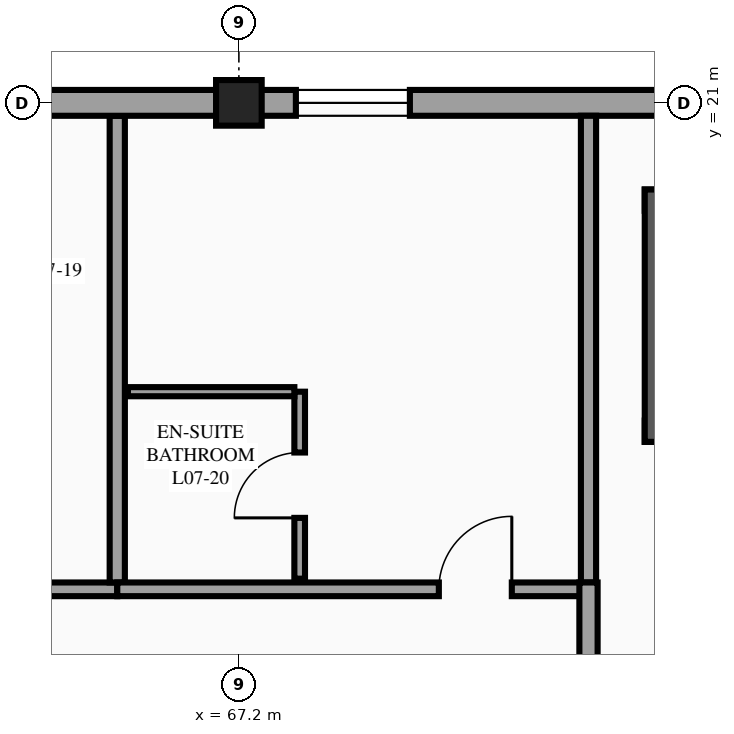
"""IFC4 building model, lengths in metres.
Left out: names, types, materials, properties, quantities, classifications, styles, units other than length and angle.
Written with IfcOpenShell. Run it as: python <this file> out.ifc"""

import sys

from ifc_helpers import new_model, si_unit, direction, frame, frame_2d, origin, origin_2d, place, context, subcontext, project, spatial, rectangle, extrude, element, fill, save


model = new_model("IFC4")
c1 = context("Model", 3, precision=1e-05, world=origin(), true_north=direction((0.0, 1.0)))
c2 = subcontext(c1, "Body", "Model", "MODEL_VIEW")
j1 = project(units=[si_unit("LENGTHUNIT", "METRE"), si_unit("PLANEANGLEUNIT", "RADIAN")], contexts=[c1])
p1 = place(None, origin())
s1 = spatial("IfcSite", under=j1, at=p1, CompositionType="ELEMENT")
p2 = place(p1, origin())
s2 = spatial("IfcBuilding", under=s1, at=p2, CompositionType="ELEMENT")
p3 = place(p2, frame((0.0, 0.0, 29.1)))
s3 = spatial("IfcBuildingStorey", under=s2, at=p3, CompositionType="ELEMENT", Elevation=29.1)
p4 = place(p3, frame((67.2, 21.0, 0.0), z_axis=(0.0, 0.0, 1.0), x_axis=(1.0, 0.0, 0.0)))
e1 = element("IfcColumn", 1, at=p4, inside=s3, PredefinedType="COLUMN", context=c2, shape_type="SweptSolid", body=[
    extrude(rectangle(XDim=0.6, YDim=0.6, at=origin_2d()), origin(), (0.0, 0.0, 1.0), 3.6),
])
p5 = place(p3, frame((75.6, 21.0, 0.0), z_axis=(0.0, 0.0, 1.0), x_axis=(-1.0, 0.0, 0.0)))
e2 = element("IfcWall", 2, at=p5, inside=s3, PredefinedType="STANDARD", context=c2, shape_type="SweptSolid", body=[
    extrude(rectangle(XDim=8.4, YDim=0.34, at=frame_2d((4.2, 0.0))), origin(), (0.0, 0.0, 1.0), 2.43),
])
p6 = place(p5, frame((6.15, 0.0, 0.85)))
e3 = element("IfcOpeningElement", 3, at=p6, cuts=e2, PredefinedType="OPENING", context=c2, shape_type="SweptSolid", body=[
    extrude(rectangle(XDim=1.5, YDim=1.5, at=frame_2d((0.75, 0.75))), frame((0.0, 0.18, 0.0), z_axis=(0.0, -1.0, 0.0), x_axis=(1.0, 0.0, 0.0)), (0.0, 0.0, 1.0), 0.36),
])
p7 = place(p3, frame((72.54, 16.68, 0.0), z_axis=(0.0, 0.0, 1.0), x_axis=(1.0, 0.0, 0.0)))
e4 = element("IfcWall", 4, at=p7, inside=s3, PredefinedType="SHEAR", context=c2, shape_type="SweptSolid", body=[
    extrude(rectangle(XDim=2.52, YDim=0.28, at=frame_2d((1.26, 0.0))), origin(), (0.0, 0.0, 1.0), 3.6),
])
p8 = place(p7, frame((0.71, 0.0, 0.0)))
e5 = element("IfcOpeningElement", 5, at=p8, cuts=e4, PredefinedType="OPENING", context=c2, shape_type="SweptSolid", body=[
    extrude(rectangle(XDim=1.1, YDim=2.2, at=frame_2d((0.55, 1.1))), frame((0.0, 0.15, 0.0), z_axis=(0.0, -1.0, 0.0), x_axis=(1.0, 0.0, 0.0)), (0.0, 0.0, 1.0), 0.3),
])
p9 = place(p3, frame((75.06, 19.72, 0.0), z_axis=(0.0, 0.0, 1.0), x_axis=(-1.0, 0.0, 0.0)))
e6 = element("IfcWall", 6, at=p9, inside=s3, PredefinedType="SHEAR", context=c2, shape_type="SweptSolid", body=[
    extrude(rectangle(XDim=2.52, YDim=0.28, at=frame_2d((1.26, 0.0))), origin(), (0.0, 0.0, 1.0), 3.6),
])
p10 = place(p3, frame((72.68, 19.86, 0.0), z_axis=(0.0, 0.0, 1.0), x_axis=(0.0, -1.0, 0.0)))
e7 = element("IfcWall", 7, at=p10, inside=s3, PredefinedType="SHEAR", context=c2, shape_type="SweptSolid", body=[
    extrude(rectangle(XDim=3.32, YDim=0.28, at=frame_2d((1.66, 0.0))), origin(), (0.0, 0.0, 1.0), 3.6),
])
p11 = place(p3, frame((59.4, 14.6, 0.0), z_axis=(0.0, 0.0, 1.0), x_axis=(1.0, 0.0, 0.0)))
e8 = element("IfcWall", 8, at=p11, inside=s3, PredefinedType="PARTITIONING", context=c2, shape_type="SweptSolid", body=[
    extrude(rectangle(XDim=6.2, YDim=0.18, at=frame_2d((3.1, 0.0))), origin(), (0.0, 0.0, 1.0), 3.375),
])
p12 = place(p11, frame((4.231, 0.0, 0.0)))
e9 = element("IfcOpeningElement", 9, at=p12, cuts=e8, PredefinedType="OPENING", context=c2, shape_type="SweptSolid", body=[
    extrude(rectangle(XDim=0.96, YDim=2.15, at=frame_2d((0.48, 1.075))), frame((0.0, 0.1, 0.0), z_axis=(0.0, -1.0, 0.0), x_axis=(1.0, 0.0, 0.0)), (0.0, 0.0, 1.0), 0.2),
])
p13 = place(p3, frame((65.6, 14.69, 0.0), z_axis=(0.0, 0.0, 1.0), x_axis=(0.0, 1.0, 0.0)))
e10 = element("IfcWall", 10, at=p13, inside=s3, PredefinedType="PARTITIONING", context=c2, shape_type="SweptSolid", body=[
    extrude(rectangle(XDim=6.14, YDim=0.2, at=frame_2d((3.07, 0.0))), origin(), (0.0, 0.0, 1.0), 3.375),
])
p14 = place(p3, frame((65.6, 14.6, 0.0), z_axis=(0.0, 0.0, 1.0), x_axis=(1.0, 0.0, 0.0)))
e11 = element("IfcWall", 11, at=p14, inside=s3, PredefinedType="PARTITIONING", context=c2, shape_type="SweptSolid", body=[
    extrude(rectangle(XDim=6.2, YDim=0.18, at=frame_2d((3.1, 0.0))), origin(), (0.0, 0.0, 1.0), 3.375),
])
p15 = place(p14, frame((4.231, 0.0, 0.0)))
e12 = element("IfcOpeningElement", 12, at=p15, cuts=e11, PredefinedType="OPENING", context=c2, shape_type="SweptSolid", body=[
    extrude(rectangle(XDim=0.96, YDim=2.15, at=frame_2d((0.48, 1.075))), frame((0.0, 0.1, 0.0), z_axis=(0.0, -1.0, 0.0), x_axis=(1.0, 0.0, 0.0)), (0.0, 0.0, 1.0), 0.2),
])
p16 = place(p3, frame((71.8, 14.69, 0.0), z_axis=(0.0, 0.0, 1.0), x_axis=(0.0, 1.0, 0.0)))
e13 = element("IfcWall", 13, at=p16, inside=s3, PredefinedType="PARTITIONING", context=c2, shape_type="SweptSolid", body=[
    extrude(rectangle(XDim=6.14, YDim=0.2, at=frame_2d((3.07, 0.0))), origin(), (0.0, 0.0, 1.0), 3.375),
])
p17 = place(p3, frame((68.0, 14.74, 0.0), z_axis=(0.0, 0.0, 1.0), x_axis=(0.0, 1.0, 0.0)))
e14 = element("IfcWall", 14, at=p17, inside=s3, PredefinedType="PARTITIONING", context=c2, shape_type="SweptSolid", body=[
    extrude(rectangle(XDim=2.46, YDim=0.14, at=frame_2d((1.23, 0.0))), origin(), (0.0, 0.0, 1.0), 3.375),
])
p18 = place(p17, frame((0.8, 0.0, 0.0)))
e15 = element("IfcOpeningElement", 15, at=p18, cuts=e14, PredefinedType="OPENING", context=c2, shape_type="SweptSolid", body=[
    extrude(rectangle(XDim=0.86, YDim=2.1, at=frame_2d((0.43, 1.05))), frame((0.0, 0.08, 0.0), z_axis=(0.0, -1.0, 0.0), x_axis=(1.0, 0.0, 0.0)), (0.0, 0.0, 1.0), 0.16),
])
p19 = place(p3, frame((65.74, 17.2, 0.0), z_axis=(0.0, 0.0, 1.0), x_axis=(1.0, 0.0, 0.0)))
e16 = element("IfcWall", 16, at=p19, inside=s3, PredefinedType="PARTITIONING", context=c2, shape_type="SweptSolid", body=[
    extrude(rectangle(XDim=2.19, YDim=0.12, at=frame_2d((1.095, 0.0))), origin(), (0.0, 0.0, 1.0), 3.375),
])
p20 = place(p3, frame((71.8, 12.94, 0.0), z_axis=(0.0, 0.0, 1.0), x_axis=(0.0, 1.0, 0.0)))
e17 = element("IfcWall", 17, at=p20, inside=s3, PredefinedType="PARTITIONING", context=c2, shape_type="SweptSolid", body=[
    extrude(rectangle(XDim=1.75, YDim=0.24, at=frame_2d((0.875, 0.0))), origin(), (0.0, 0.0, 1.0), 3.375),
])
p21 = place(p3, frame((67.2, 21.0, 0.0), z_axis=(0.0, 0.0, 1.0), x_axis=(-1.0, 0.0, 0.0)))
e18 = element("IfcWall", 18, at=p21, inside=s3, PredefinedType="STANDARD", context=c2, shape_type="SweptSolid", body=[
    extrude(rectangle(XDim=8.4, YDim=0.34, at=frame_2d((4.2, 0.0))), origin(), (0.0, 0.0, 1.0), 2.78),
])
p22 = place(p21, frame((3.95, 0.0, 0.85)))
e19 = element("IfcOpeningElement", 19, at=p22, cuts=e18, PredefinedType="OPENING", context=c2, shape_type="SweptSolid", body=[
    extrude(rectangle(XDim=1.5, YDim=1.5, at=frame_2d((0.75, 0.75))), frame((0.0, 0.18, 0.0), z_axis=(0.0, -1.0, 0.0), x_axis=(1.0, 0.0, 0.0)), (0.0, 0.0, 1.0), 0.36),
])
p23 = place(p6, origin())
e20 = element("IfcWindow", 20, at=p23, inside=s3, PartitioningType="SINGLE_PANEL", PredefinedType="WINDOW", context=c2, shape_type="SweptSolid", body=[
    extrude(rectangle(XDim=1.5, YDim=1.5, at=frame_2d((0.75, 0.75))), frame((0.0, 0.03, 0.0), z_axis=(0.0, -1.0, 0.0), x_axis=(1.0, 0.0, 0.0)), (0.0, 0.0, 1.0), 0.06),
])
fill(e3, e20)
p24 = place(p15, origin())
e21 = element("IfcDoor", 21, at=p24, inside=s3, OperationType="SINGLE_SWING_RIGHT", PredefinedType="DOOR", context=c2, shape_type="SweptSolid", body=[
    extrude(rectangle(XDim=0.96, YDim=2.15, at=frame_2d((0.48, 1.075))), frame((0.0, 0.025, 0.0), z_axis=(0.0, -1.0, 0.0), x_axis=(1.0, 0.0, 0.0)), (0.0, 0.0, 1.0), 0.05),
])
fill(e12, e21)
p25 = place(p18, origin())
e22 = element("IfcDoor", 22, at=p25, inside=s3, OperationType="SINGLE_SWING_LEFT", PredefinedType="DOOR", context=c2, shape_type="SweptSolid", body=[
    extrude(rectangle(XDim=0.86, YDim=2.1, at=frame_2d((0.43, 1.05))), frame((0.0, 0.025, 0.0), z_axis=(0.0, -1.0, 0.0), x_axis=(1.0, 0.0, 0.0)), (0.0, 0.0, 1.0), 0.05),
])
fill(e15, e22)
save(model, sys.argv[1])
